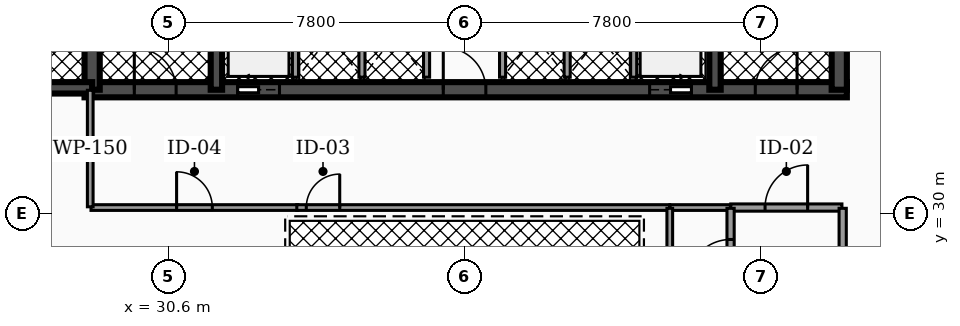
"""IFC4 building model, lengths in metres.
Left out: names, types, materials, properties, quantities, classifications, styles, units other than length and angle.
Written with IfcOpenShell. Run it as: python <this file> out.ifc"""

import sys

from ifc_helpers import new_model, si_unit, direction, frame, frame_2d, origin, place, context, subcontext, project, spatial, rectangle, extrude, element, fill, save


model = new_model("IFC4")
c1 = context("Model", 3, precision=1e-05, world=origin(), true_north=direction((0.0, 1.0)))
c2 = subcontext(c1, "Body", "Model", "MODEL_VIEW")
j1 = project(units=[si_unit("LENGTHUNIT", "METRE"), si_unit("PLANEANGLEUNIT", "RADIAN")], contexts=[c1])
p1 = place(None, origin())
s1 = spatial("IfcSite", under=j1, at=p1, CompositionType="ELEMENT")
p2 = place(p1, origin())
s2 = spatial("IfcBuilding", under=s1, at=p2, CompositionType="ELEMENT")
p3 = place(p2, frame((0.0, 0.0, 105.06)))
s3 = spatial("IfcBuildingStorey", under=s2, at=p3, CompositionType="ELEMENT", Elevation=105.06)
p4 = place(p3, frame((28.4, 33.25, 0.0), z_axis=(0.0, 0.0, 1.0), x_axis=(1.0, 0.0, 0.0)))
e1 = element("IfcWall", 1, at=p4, inside=s3, PredefinedType="SHEAR", context=c2, shape_type="SweptSolid", body=[
    extrude(rectangle(XDim=20.06, YDim=0.4, at=frame_2d((10.03, 0.0))), origin(), (0.0, 0.0, 1.0), 3.73),
])
p5 = place(p4, frame((4.03, 0.0, 0.0)))
e2 = element("IfcOpeningElement", 2, at=p5, cuts=e1, PredefinedType="OPENING", context=c2, shape_type="SweptSolid", body=[
    extrude(rectangle(XDim=1.1, YDim=2.15, at=frame_2d((0.55, 1.075))), frame((0.0, 0.21, 0.0), z_axis=(0.0, -1.0, 0.0), x_axis=(1.0, 0.0, 0.0)), (0.0, 0.0, 1.0), 0.42),
])
p6 = place(p4, frame((14.87, 0.0, 0.0)))
e3 = element("IfcOpeningElement", 3, at=p6, cuts=e1, PredefinedType="OPENING", context=c2, shape_type="SweptSolid", body=[
    extrude(rectangle(XDim=1.1, YDim=2.15, at=frame_2d((0.55, 1.075))), frame((0.0, 0.21, 0.0), z_axis=(0.0, -1.0, 0.0), x_axis=(1.0, 0.0, 0.0)), (0.0, 0.0, 1.0), 0.42),
])
p7 = place(p4, frame((1.31, 0.0, 0.0)))
e4 = element("IfcOpeningElement", 4, at=p7, cuts=e1, PredefinedType="OPENING", context=c2, shape_type="SweptSolid", body=[
    extrude(rectangle(XDim=1.1, YDim=2.2, at=frame_2d((0.55, 1.1))), frame((0.0, 0.21, 0.0), z_axis=(0.0, -1.0, 0.0), x_axis=(1.0, 0.0, 0.0)), (0.0, 0.0, 1.0), 0.42),
])
p8 = place(p4, frame((9.44, 0.0, 0.0)))
e5 = element("IfcOpeningElement", 5, at=p8, cuts=e1, PredefinedType="OPENING", context=c2, shape_type="SweptSolid", body=[
    extrude(rectangle(XDim=1.12, YDim=2.05, at=frame_2d((0.56, 1.025))), frame((0.0, 0.21, 0.0), z_axis=(0.0, -1.0, 0.0), x_axis=(1.0, 0.0, 0.0)), (0.0, 0.0, 1.0), 0.42),
])
p9 = place(p4, frame((17.65, 0.0, 0.0)))
e6 = element("IfcOpeningElement", 6, at=p9, cuts=e1, PredefinedType="OPENING", context=c2, shape_type="SweptSolid", body=[
    extrude(rectangle(XDim=1.1, YDim=2.2, at=frame_2d((0.55, 1.1))), frame((0.0, 0.21, 0.0), z_axis=(0.0, -1.0, 0.0), x_axis=(1.0, 0.0, 0.0)), (0.0, 0.0, 1.0), 0.42),
])
p10 = place(p3, frame((28.6, 33.25, 0.0), z_axis=(0.0, 0.0, 1.0), x_axis=(0.0, 1.0, 0.0)))
e7 = element("IfcWall", 7, at=p10, inside=s3, PredefinedType="SHEAR", context=c2, shape_type="SweptSolid", body=[
    extrude(rectangle(XDim=10.2, YDim=0.4, at=frame_2d((5.1, 0.0))), origin(), (0.0, 0.0, 1.0), 3.73),
])
for number, where, z_axis, x_axis in (
    (8, (31.87, 33.25, 0.0), (0.0, 0.0, 1.0), (0.0, 1.0, 0.0)),
    (9, (44.99, 33.25, 0.0), (0.0, 0.0, 1.0), (0.0, 1.0, 0.0)),
):
    element("IfcWall", number, at=place(p3, frame(where, z_axis=z_axis, x_axis=x_axis)), inside=s3, PredefinedType="SHEAR", context=c2, shape_type="SweptSolid", body=[
        extrude(rectangle(XDim=10.2, YDim=0.3, at=frame_2d((5.1, 0.0))), origin(), (0.0, 0.0, 1.0), 3.73),
    ])
p11 = place(p3, frame((48.26, 33.25, 0.0), z_axis=(0.0, 0.0, 1.0), x_axis=(0.0, 1.0, 0.0)))
e10 = element("IfcWall", 10, at=p11, inside=s3, PredefinedType="SHEAR", context=c2, shape_type="SweptSolid", body=[
    extrude(rectangle(XDim=10.2, YDim=0.4, at=frame_2d((5.1, 0.0))), origin(), (0.0, 0.0, 1.0), 3.73),
])
p12 = place(p3, frame((25.08, 33.3, 0.0), z_axis=(0.0, 0.0, 1.0), x_axis=(1.0, 0.0, 0.0)))
e11 = element("IfcWall", 11, at=p12, inside=s3, PredefinedType="SHEAR", context=c2, shape_type="SweptSolid", body=[
    extrude(rectangle(XDim=3.52, YDim=0.3, at=frame_2d((1.76, 0.0))), origin(), (0.0, 0.0, 1.0), 3.73),
])
p13 = place(p12, frame((1.335, 0.0, 0.0)))
e12 = element("IfcOpeningElement", 12, at=p13, cuts=e11, PredefinedType="OPENING", context=c2, shape_type="SweptSolid", body=[
    extrude(rectangle(XDim=0.95, YDim=2.2, at=frame_2d((0.475, 1.1))), frame((0.0, 0.16, 0.0), z_axis=(0.0, -1.0, 0.0), x_axis=(1.0, 0.0, 0.0)), (0.0, 0.0, 1.0), 0.32),
])
for number, where, z_axis, x_axis in (
    (13, (33.95, 33.58, 0.0), (0.0, 0.0, 1.0), (0.0, 1.0, 0.0)),
    (14, (42.85, 33.58, 0.0), (0.0, 0.0, 1.0), (0.0, 1.0, 0.0)),
):
    element("IfcWall", number, at=place(p3, frame(where, z_axis=z_axis, x_axis=x_axis)), inside=s3, PredefinedType="SOLIDWALL", context=c2, shape_type="SweptSolid", body=[
        extrude(rectangle(XDim=2.45, YDim=0.16, at=frame_2d((1.225, 0.0))), origin(), (0.0, 0.0, 1.0), 2.702),
    ])
for number, where, z_axis, x_axis in (
    (15, (35.7, 33.58, 0.0), (0.0, 0.0, 1.0), (0.0, 1.0, 0.0)),
    (16, (37.4, 33.58, 0.0), (0.0, 0.0, 1.0), (0.0, 1.0, 0.0)),
    (17, (39.4, 33.58, 0.0), (0.0, 0.0, 1.0), (0.0, 1.0, 0.0)),
    (18, (41.1, 33.58, 0.0), (0.0, 0.0, 1.0), (0.0, 1.0, 0.0)),
):
    element("IfcWall", number, at=place(p3, frame(where, z_axis=z_axis, x_axis=x_axis)), inside=s3, PredefinedType="SOLIDWALL", context=c2, shape_type="SweptSolid", body=[
        extrude(rectangle(XDim=2.25, YDim=0.16, at=frame_2d((1.125, 0.0))), origin(), (0.0, 0.0, 1.0), 2.702),
    ])
p14 = place(p3, frame((45.405, 30.15, 0.0), z_axis=(0.0, 0.0, 1.0), x_axis=(1.0, 0.0, 0.0)))
e19 = element("IfcWall", 19, at=p14, inside=s3, PredefinedType="PARTITIONING", context=c2, shape_type="SweptSolid", body=[
    extrude(rectangle(XDim=2.925, YDim=0.19, at=frame_2d((1.462, 0.0))), origin(), (0.0, 0.0, 1.0), 2.687),
])
p15 = place(p14, frame((0.903, 0.0, 0.0)))
e20 = element("IfcOpeningElement", 20, at=p15, cuts=e19, PredefinedType="OPENING", context=c2, shape_type="SweptSolid", body=[
    extrude(rectangle(XDim=1.12, YDim=2.05, at=frame_2d((0.56, 1.025))), frame((0.0, 0.105, 0.0), z_axis=(0.0, -1.0, 0.0), x_axis=(1.0, 0.0, 0.0)), (0.0, 0.0, 1.0), 0.21),
])
p16 = place(p3, frame((43.805, 30.15, 0.0), z_axis=(0.0, 0.0, 1.0), x_axis=(1.0, 0.0, 0.0)))
e21 = element("IfcWall", 21, at=p16, inside=s3, PredefinedType="PARTITIONING", context=c2, shape_type="SweptSolid", body=[
    extrude(rectangle(XDim=1.59, YDim=0.15, at=frame_2d((0.795, 0.0))), origin(), (0.0, 0.0, 1.0), 2.687),
])
p17 = place(p3, frame((28.57, 30.15, 0.0), z_axis=(0.0, 0.0, 1.0), x_axis=(1.0, 0.0, 0.0)))
e22 = element("IfcWall", 22, at=p17, inside=s3, PredefinedType="PARTITIONING", context=c2, shape_type="SweptSolid", body=[
    extrude(rectangle(XDim=5.445, YDim=0.15, at=frame_2d((2.722, 0.0))), origin(), (0.0, 0.0, 1.0), 2.687),
])
p18 = place(p17, frame((2.252, 0.0, 0.0)))
e23 = element("IfcOpeningElement", 23, at=p18, cuts=e22, PredefinedType="OPENING", context=c2, shape_type="SweptSolid", body=[
    extrude(rectangle(XDim=0.94, YDim=2.05, at=frame_2d((0.47, 1.025))), frame((0.0, 0.085, 0.0), z_axis=(0.0, -1.0, 0.0), x_axis=(1.0, 0.0, 0.0)), (0.0, 0.0, 1.0), 0.17),
])
p19 = place(p3, frame((28.55, 30.17, 0.0), z_axis=(0.0, 0.0, 1.0), x_axis=(0.0, 1.0, 0.0)))
e24 = element("IfcWall", 24, at=p19, inside=s3, PredefinedType="PARTITIONING", context=c2, shape_type="SweptSolid", body=[
    extrude(rectangle(XDim=3.065, YDim=0.15, at=frame_2d((1.533, 0.0))), origin(), (0.0, 0.0, 1.0), 2.687),
])
p20 = place(p3, frame((33.985, 30.15, 0.0), z_axis=(0.0, 0.0, 1.0), x_axis=(1.0, 0.0, 0.0)))
e25 = element("IfcWall", 25, at=p20, inside=s3, PredefinedType="PARTITIONING", context=c2, shape_type="SweptSolid", body=[
    extrude(rectangle(XDim=9.81, YDim=0.15, at=frame_2d((4.905, 0.0))), origin(), (0.0, 0.0, 1.0), 2.687),
])
p21 = place(p20, frame((0.25, 0.0, 0.0)))
e26 = element("IfcOpeningElement", 26, at=p21, cuts=e25, PredefinedType="OPENING", context=c2, shape_type="SweptSolid", body=[
    extrude(rectangle(XDim=0.88, YDim=2.05, at=frame_2d((0.44, 1.025))), frame((0.0, 0.085, 0.0), z_axis=(0.0, -1.0, 0.0), x_axis=(1.0, 0.0, 0.0)), (0.0, 0.0, 1.0), 0.17),
])
p22 = place(p3, frame((45.4, 27.37, 0.0), z_axis=(0.0, 0.0, 1.0), x_axis=(0.0, 1.0, 0.0)))
e27 = element("IfcWall", 27, at=p22, inside=s3, PredefinedType="PARTITIONING", context=c2, shape_type="SweptSolid", body=[
    extrude(rectangle(XDim=2.76, YDim=0.19, at=frame_2d((1.38, 0.0))), origin(), (0.0, 0.0, 1.0), 2.687),
])
p23 = place(p22, frame((0.82, 0.0, 0.0)))
e28 = element("IfcOpeningElement", 28, at=p23, cuts=e27, PredefinedType="OPENING", context=c2, shape_type="SweptSolid", body=[
    extrude(rectangle(XDim=1.12, YDim=2.05, at=frame_2d((0.56, 1.025))), frame((0.0, 0.105, 0.0), z_axis=(0.0, -1.0, 0.0), x_axis=(1.0, 0.0, 0.0)), (0.0, 0.0, 1.0), 0.21),
])
p24 = place(p3, frame((48.35, 27.37, 0.0), z_axis=(0.0, 0.0, 1.0), x_axis=(0.0, 1.0, 0.0)))
e29 = element("IfcWall", 29, at=p24, inside=s3, PredefinedType="PARTITIONING", context=c2, shape_type="SweptSolid", body=[
    extrude(rectangle(XDim=2.76, YDim=0.19, at=frame_2d((1.38, 0.0))), origin(), (0.0, 0.0, 1.0), 2.687),
])
p25 = place(p3, frame((43.8, 23.62, 0.0), z_axis=(0.0, 0.0, 1.0), x_axis=(0.0, 1.0, 0.0)))
e30 = element("IfcWall", 30, at=p25, inside=s3, PredefinedType="PARTITIONING", context=c2, shape_type="SweptSolid", body=[
    extrude(rectangle(XDim=6.51, YDim=0.15, at=frame_2d((3.255, 0.0))), origin(), (0.0, 0.0, 1.0), 2.687),
])
p26 = place(p5, origin())
e31 = element("IfcDoor", 31, at=p26, inside=s3, OperationType="SLIDING_TO_LEFT", PredefinedType="DOOR", context=c2, shape_type="SweptSolid", body=[
    extrude(rectangle(XDim=1.1, YDim=2.15, at=frame_2d((0.55, 1.075))), frame((0.0, 0.025, 0.0), z_axis=(0.0, -1.0, 0.0), x_axis=(1.0, 0.0, 0.0)), (0.0, 0.0, 1.0), 0.05),
])
fill(e2, e31)
p27 = place(p6, origin())
e32 = element("IfcDoor", 32, at=p27, inside=s3, OperationType="SLIDING_TO_RIGHT", PredefinedType="DOOR", context=c2, shape_type="SweptSolid", body=[
    extrude(rectangle(XDim=1.1, YDim=2.15, at=frame_2d((0.55, 1.075))), frame((0.0, 0.025, 0.0), z_axis=(0.0, -1.0, 0.0), x_axis=(1.0, 0.0, 0.0)), (0.0, 0.0, 1.0), 0.05),
])
fill(e3, e32)
p28 = place(p7, origin())
e33 = element("IfcDoor", 33, at=p28, inside=s3, OperationType="SINGLE_SWING_LEFT", PredefinedType="DOOR", context=c2, shape_type="SweptSolid", body=[
    extrude(rectangle(XDim=1.1, YDim=2.2, at=frame_2d((0.55, 1.1))), frame((0.0, 0.025, 0.0), z_axis=(0.0, -1.0, 0.0), x_axis=(1.0, 0.0, 0.0)), (0.0, 0.0, 1.0), 0.05),
])
fill(e4, e33)
p29 = place(p8, origin())
e34 = element("IfcDoor", 34, at=p29, inside=s3, OperationType="SINGLE_SWING_LEFT", PredefinedType="DOOR", context=c2, shape_type="SweptSolid", body=[
    extrude(rectangle(XDim=1.12, YDim=2.05, at=frame_2d((0.56, 1.025))), frame((0.0, 0.025, 0.0), z_axis=(0.0, -1.0, 0.0), x_axis=(1.0, 0.0, 0.0)), (0.0, 0.0, 1.0), 0.05),
])
fill(e5, e34)
p30 = place(p9, origin())
e35 = element("IfcDoor", 35, at=p30, inside=s3, OperationType="SINGLE_SWING_RIGHT", PredefinedType="DOOR", context=c2, shape_type="SweptSolid", body=[
    extrude(rectangle(XDim=1.1, YDim=2.2, at=frame_2d((0.55, 1.1))), frame((0.0, 0.025, 0.0), z_axis=(0.0, -1.0, 0.0), x_axis=(1.0, 0.0, 0.0)), (0.0, 0.0, 1.0), 0.05),
])
fill(e6, e35)
p31 = place(p15, origin())
e36 = element("IfcDoor", 36, at=p31, inside=s3, OperationType="SINGLE_SWING_RIGHT", PredefinedType="DOOR", context=c2, shape_type="SweptSolid", body=[
    extrude(rectangle(XDim=1.12, YDim=2.05, at=frame_2d((0.56, 1.025))), frame((0.0, 0.025, 0.0), z_axis=(0.0, -1.0, 0.0), x_axis=(1.0, 0.0, 0.0)), (0.0, 0.0, 1.0), 0.05),
])
fill(e20, e36)
p32 = place(p18, origin())
e37 = element("IfcDoor", 37, at=p32, inside=s3, OperationType="SINGLE_SWING_LEFT", PredefinedType="DOOR", context=c2, shape_type="SweptSolid", body=[
    extrude(rectangle(XDim=0.94, YDim=2.05, at=frame_2d((0.47, 1.025))), frame((0.0, 0.025, 0.0), z_axis=(0.0, -1.0, 0.0), x_axis=(1.0, 0.0, 0.0)), (0.0, 0.0, 1.0), 0.05),
])
fill(e23, e37)
p33 = place(p21, origin())
e38 = element("IfcDoor", 38, at=p33, inside=s3, OperationType="SINGLE_SWING_RIGHT", PredefinedType="DOOR", context=c2, shape_type="SweptSolid", body=[
    extrude(rectangle(XDim=0.88, YDim=2.05, at=frame_2d((0.44, 1.025))), frame((0.0, 0.025, 0.0), z_axis=(0.0, -1.0, 0.0), x_axis=(1.0, 0.0, 0.0)), (0.0, 0.0, 1.0), 0.05),
])
fill(e26, e38)
p34 = place(p23, origin())
e39 = element("IfcDoor", 39, at=p34, inside=s3, OperationType="SINGLE_SWING_LEFT", PredefinedType="DOOR", context=c2, shape_type="SweptSolid", body=[
    extrude(rectangle(XDim=1.12, YDim=2.05, at=frame_2d((0.56, 1.025))), frame((0.0, 0.025, 0.0), z_axis=(0.0, -1.0, 0.0), x_axis=(1.0, 0.0, 0.0)), (0.0, 0.0, 1.0), 0.05),
])
fill(e28, e39)
save(model, sys.argv[1])
